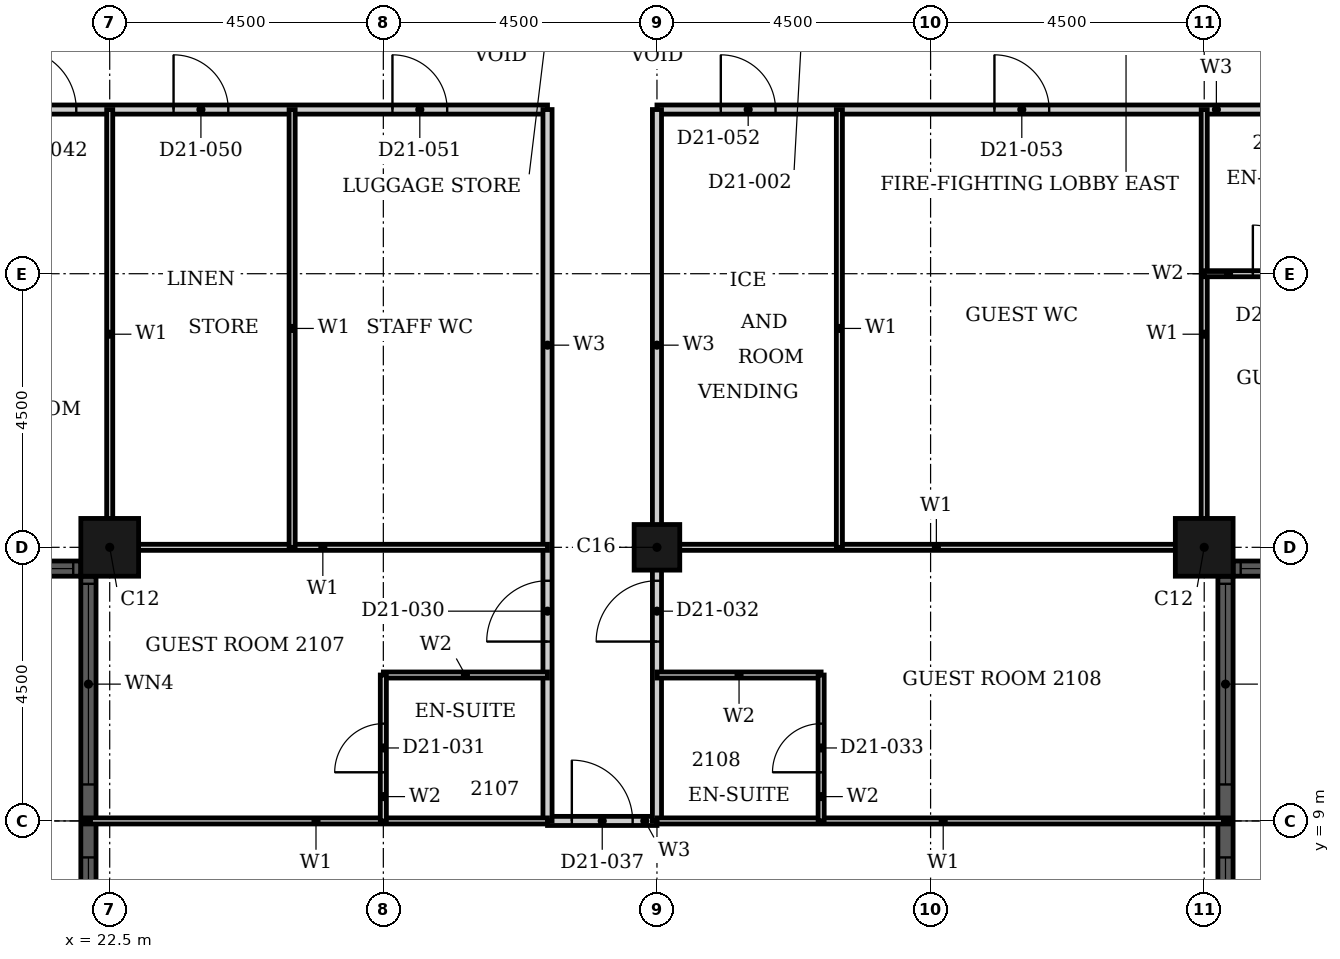
"""IFC4 building model, lengths in metres.
Left out: names, types, materials, properties, quantities, classifications, styles, units other than length and angle.
Written with IfcOpenShell. Run it as: python <this file> out.ifc"""

import sys

from ifc_helpers import new_model, si_unit, direction, frame, frame_2d, origin, origin_2d, place, context, subcontext, project, spatial, rectangle, hollow_rectangle, extrude, element, fill, save


model = new_model("IFC4")
c1 = context("Model", 3, precision=1e-05, world=origin(), true_north=direction((0.0, 1.0)))
c2 = subcontext(c1, "Body", "Model", "MODEL_VIEW")
j1 = project(units=[si_unit("LENGTHUNIT", "METRE"), si_unit("PLANEANGLEUNIT", "RADIAN")], contexts=[c1])
p1 = place(None, origin())
s1 = spatial("IfcSite", under=j1, at=p1, CompositionType="ELEMENT")
p2 = place(p1, origin())
s2 = spatial("IfcBuilding", under=s1, at=p2, CompositionType="ELEMENT")
p3 = place(p2, frame((0.0, 0.0, 88.8)))
s3 = spatial("IfcBuildingStorey", under=s2, at=p3, CompositionType="ELEMENT", Elevation=88.8)
for number, where, z_axis, x_axis in (
    (1, (40.5, 13.5, 0.0), (0.0, 0.0, 1.0), (1.0, 0.0, 0.0)),
    (2, (22.5, 13.5, 0.0), (0.0, 0.0, 1.0), (1.0, 0.0, 0.0)),
):
    element("IfcColumn", number, at=place(p3, frame(where, z_axis=z_axis, x_axis=x_axis)), inside=s3, PredefinedType="COLUMN", context=c2, shape_type="SweptSolid", body=[
        extrude(hollow_rectangle(XDim=0.95, YDim=0.95, WallThickness=0.03, at=origin_2d()), origin(), (0.0, 0.0, 1.0), 3.6),
    ])
p4 = place(p3, frame((31.5, 13.5, 0.0), z_axis=(0.0, 0.0, 1.0), x_axis=(1.0, 0.0, 0.0)))
e3 = element("IfcColumn", 3, at=p4, inside=s3, PredefinedType="COLUMN", context=c2, shape_type="SweptSolid", body=[
    extrude(hollow_rectangle(XDim=0.75, YDim=0.75, WallThickness=0.024, at=origin_2d()), origin(), (0.0, 0.0, 1.0), 3.6),
])
p5 = place(p3, frame((40.85, 4.975, 0.0), z_axis=(0.0, 0.0, 1.0), x_axis=(0.0, 1.0, 0.0)))
e4 = element("IfcWall", 4, at=p5, inside=s3, PredefinedType="SOLIDWALL", context=c2, shape_type="SweptSolid", body=[
    extrude(rectangle(XDim=8.05, YDim=0.25, at=frame_2d((4.025, 0.0))), origin(), (0.0, 0.0, 1.0), 3.6),
])
p6 = place(p5, frame((0.125, 0.0, 0.9)))
e5 = element("IfcOpeningElement", 5, at=p6, cuts=e4, PredefinedType="OPENING", context=c2, shape_type="SweptSolid", body=[
    extrude(rectangle(XDim=3.3, YDim=2.08, at=frame_2d((1.65, 1.04))), frame((0.0, 0.135, 0.0), z_axis=(0.0, -1.0, 0.0), x_axis=(1.0, 0.0, 0.0)), (0.0, 0.0, 1.0), 0.27),
])
p7 = place(p5, frame((4.625, 0.0, 0.9)))
e6 = element("IfcOpeningElement", 6, at=p7, cuts=e4, PredefinedType="OPENING", context=c2, shape_type="SweptSolid", body=[
    extrude(rectangle(XDim=3.3, YDim=2.08, at=frame_2d((1.65, 1.04))), frame((0.0, 0.135, 0.0), z_axis=(0.0, -1.0, 0.0), x_axis=(1.0, 0.0, 0.0)), (0.0, 0.0, 1.0), 0.27),
])
p8 = place(p3, frame((40.975, 13.15, 0.0), z_axis=(0.0, 0.0, 1.0), x_axis=(1.0, 0.0, 0.0)))
e7 = element("IfcWall", 7, at=p8, inside=s3, PredefinedType="SOLIDWALL", context=c2, shape_type="SweptSolid", body=[
    extrude(rectangle(XDim=3.55, YDim=0.25, at=frame_2d((1.775, 0.0))), origin(), (0.0, 0.0, 1.0), 3.6),
])
p9 = place(p8, frame((0.125, 0.0, 0.9)))
e8 = element("IfcOpeningElement", 8, at=p9, cuts=e7, PredefinedType="OPENING", context=c2, shape_type="SweptSolid", body=[
    extrude(rectangle(XDim=3.3, YDim=2.08, at=frame_2d((1.65, 1.04))), frame((0.0, 0.135, 0.0), z_axis=(0.0, -1.0, 0.0), x_axis=(1.0, 0.0, 0.0)), (0.0, 0.0, 1.0), 0.27),
])
p10 = place(p3, frame((18.475, 13.15, 0.0), z_axis=(0.0, 0.0, 1.0), x_axis=(1.0, 0.0, 0.0)))
e9 = element("IfcWall", 9, at=p10, inside=s3, PredefinedType="SOLIDWALL", context=c2, shape_type="SweptSolid", body=[
    extrude(rectangle(XDim=3.55, YDim=0.25, at=frame_2d((1.775, 0.0))), origin(), (0.0, 0.0, 1.0), 3.6),
])
p11 = place(p10, frame((0.125, 0.0, 0.9)))
e10 = element("IfcOpeningElement", 10, at=p11, cuts=e9, PredefinedType="OPENING", context=c2, shape_type="SweptSolid", body=[
    extrude(rectangle(XDim=3.3, YDim=2.08, at=frame_2d((1.65, 1.04))), frame((0.0, 0.135, 0.0), z_axis=(0.0, -1.0, 0.0), x_axis=(1.0, 0.0, 0.0)), (0.0, 0.0, 1.0), 0.27),
])
p12 = place(p3, frame((22.15, 13.025, 0.0), z_axis=(0.0, 0.0, 1.0), x_axis=(0.0, -1.0, 0.0)))
e11 = element("IfcWall", 11, at=p12, inside=s3, PredefinedType="SOLIDWALL", context=c2, shape_type="SweptSolid", body=[
    extrude(rectangle(XDim=8.05, YDim=0.25, at=frame_2d((4.025, 0.0))), origin(), (0.0, 0.0, 1.0), 3.6),
])
p13 = place(p12, frame((0.125, 0.0, 0.9)))
e12 = element("IfcOpeningElement", 12, at=p13, cuts=e11, PredefinedType="OPENING", context=c2, shape_type="SweptSolid", body=[
    extrude(rectangle(XDim=3.3, YDim=2.08, at=frame_2d((1.65, 1.04))), frame((0.0, 0.135, 0.0), z_axis=(0.0, -1.0, 0.0), x_axis=(1.0, 0.0, 0.0)), (0.0, 0.0, 1.0), 0.27),
])
p14 = place(p12, frame((4.625, 0.0, 0.9)))
e13 = element("IfcOpeningElement", 13, at=p14, cuts=e11, PredefinedType="OPENING", context=c2, shape_type="SweptSolid", body=[
    extrude(rectangle(XDim=3.3, YDim=2.08, at=frame_2d((1.65, 1.04))), frame((0.0, 0.135, 0.0), z_axis=(0.0, -1.0, 0.0), x_axis=(1.0, 0.0, 0.0)), (0.0, 0.0, 1.0), 0.27),
])
p15 = place(p3, frame((31.5, 20.7, 0.0), z_axis=(0.0, 0.0, 1.0), x_axis=(1.0, 0.0, 0.0)))
e14 = element("IfcWall", 14, at=p15, inside=s3, PredefinedType="PARTITIONING", context=c2, shape_type="SweptSolid", body=[
    extrude(rectangle(XDim=13.5, YDim=0.15, at=frame_2d((6.75, 0.0))), origin(), (0.0, 0.0, 1.0), 3.3),
])
p16 = place(p15, frame((11.95, 0.0, 0.0)))
e15 = element("IfcOpeningElement", 15, at=p16, cuts=e14, PredefinedType="OPENING", context=c2, shape_type="SweptSolid", body=[
    extrude(rectangle(XDim=1.0, YDim=2.1, at=frame_2d((0.5, 1.05))), frame((0.0, 0.085, 0.0), z_axis=(0.0, -1.0, 0.0), x_axis=(1.0, 0.0, 0.0)), (0.0, 0.0, 1.0), 0.17),
])
p17 = place(p15, frame((1.05, 0.0, 0.0)))
e16 = element("IfcOpeningElement", 16, at=p17, cuts=e14, PredefinedType="OPENING", context=c2, shape_type="SweptSolid", body=[
    extrude(rectangle(XDim=0.9, YDim=2.1, at=frame_2d((0.45, 1.05))), frame((0.0, 0.085, 0.0), z_axis=(0.0, -1.0, 0.0), x_axis=(1.0, 0.0, 0.0)), (0.0, 0.0, 1.0), 0.17),
])
p18 = place(p15, frame((5.55, 0.0, 0.0)))
e17 = element("IfcOpeningElement", 17, at=p18, cuts=e14, PredefinedType="OPENING", context=c2, shape_type="SweptSolid", body=[
    extrude(rectangle(XDim=0.9, YDim=2.1, at=frame_2d((0.45, 1.05))), frame((0.0, 0.085, 0.0), z_axis=(0.0, -1.0, 0.0), x_axis=(1.0, 0.0, 0.0)), (0.0, 0.0, 1.0), 0.17),
])
p19 = place(p3, frame((16.2, 20.7, 0.0), z_axis=(0.0, 0.0, 1.0), x_axis=(1.0, 0.0, 0.0)))
e18 = element("IfcWall", 18, at=p19, inside=s3, PredefinedType="PARTITIONING", context=c2, shape_type="SweptSolid", body=[
    extrude(rectangle(XDim=13.5, YDim=0.15, at=frame_2d((6.75, 0.0))), origin(), (0.0, 0.0, 1.0), 3.3),
])
p20 = place(p19, frame((4.75, 0.0, 0.0)))
e19 = element("IfcOpeningElement", 19, at=p20, cuts=e18, PredefinedType="OPENING", context=c2, shape_type="SweptSolid", body=[
    extrude(rectangle(XDim=1.0, YDim=2.1, at=frame_2d((0.5, 1.05))), frame((0.0, 0.085, 0.0), z_axis=(0.0, -1.0, 0.0), x_axis=(1.0, 0.0, 0.0)), (0.0, 0.0, 1.0), 0.17),
])
p21 = place(p19, frame((0.45, 0.0, 0.0)))
e20 = element("IfcOpeningElement", 20, at=p21, cuts=e18, PredefinedType="OPENING", context=c2, shape_type="SweptSolid", body=[
    extrude(rectangle(XDim=0.9, YDim=2.1, at=frame_2d((0.45, 1.05))), frame((0.0, 0.085, 0.0), z_axis=(0.0, -1.0, 0.0), x_axis=(1.0, 0.0, 0.0)), (0.0, 0.0, 1.0), 0.17),
])
p22 = place(p19, frame((7.35, 0.0, 0.0)))
e21 = element("IfcOpeningElement", 21, at=p22, cuts=e18, PredefinedType="OPENING", context=c2, shape_type="SweptSolid", body=[
    extrude(rectangle(XDim=0.9, YDim=2.1, at=frame_2d((0.45, 1.05))), frame((0.0, 0.085, 0.0), z_axis=(0.0, -1.0, 0.0), x_axis=(1.0, 0.0, 0.0)), (0.0, 0.0, 1.0), 0.17),
])
p23 = place(p19, frame((10.95, 0.0, 0.0)))
e22 = element("IfcOpeningElement", 22, at=p23, cuts=e18, PredefinedType="OPENING", context=c2, shape_type="SweptSolid", body=[
    extrude(rectangle(XDim=0.9, YDim=2.1, at=frame_2d((0.45, 1.05))), frame((0.0, 0.085, 0.0), z_axis=(0.0, -1.0, 0.0), x_axis=(1.0, 0.0, 0.0)), (0.0, 0.0, 1.0), 0.17),
])
p24 = place(p3, frame((29.7, 9.0, 0.0), z_axis=(0.0, 0.0, 1.0), x_axis=(1.0, 0.0, 0.0)))
e23 = element("IfcWall", 23, at=p24, inside=s3, PredefinedType="PARTITIONING", context=c2, shape_type="SweptSolid", body=[
    extrude(rectangle(XDim=1.8, YDim=0.15, at=frame_2d((0.9, 0.0))), origin(), (0.0, 0.0, 1.0), 3.3),
])
p25 = place(p24, frame((0.4, 0.0, 0.0)))
e24 = element("IfcOpeningElement", 24, at=p25, cuts=e23, PredefinedType="OPENING", context=c2, shape_type="SweptSolid", body=[
    extrude(rectangle(XDim=1.0, YDim=2.1, at=frame_2d((0.5, 1.05))), frame((0.0, 0.085, 0.0), z_axis=(0.0, -1.0, 0.0), x_axis=(1.0, 0.0, 0.0)), (0.0, 0.0, 1.0), 0.17),
])
p26 = place(p3, frame((29.7, 9.0, 0.0), z_axis=(0.0, 0.0, 1.0), x_axis=(0.0, 1.0, 0.0)))
e25 = element("IfcWall", 25, at=p26, inside=s3, PredefinedType="PARTITIONING", context=c2, shape_type="SweptSolid", body=[
    extrude(rectangle(XDim=11.7, YDim=0.15, at=frame_2d((5.85, 0.0))), origin(), (0.0, 0.0, 1.0), 3.3),
])
p27 = place(p26, frame((2.95, 0.0, 0.0)))
e26 = element("IfcOpeningElement", 26, at=p27, cuts=e25, PredefinedType="OPENING", context=c2, shape_type="SweptSolid", body=[
    extrude(rectangle(XDim=1.0, YDim=2.1, at=frame_2d((0.5, 1.05))), frame((0.0, 0.085, 0.0), z_axis=(0.0, -1.0, 0.0), x_axis=(1.0, 0.0, 0.0)), (0.0, 0.0, 1.0), 0.17),
])
p28 = place(p3, frame((31.5, 9.0, 0.0), z_axis=(0.0, 0.0, 1.0), x_axis=(0.0, 1.0, 0.0)))
e27 = element("IfcWall", 27, at=p28, inside=s3, PredefinedType="PARTITIONING", context=c2, shape_type="SweptSolid", body=[
    extrude(rectangle(XDim=11.7, YDim=0.15, at=frame_2d((5.85, 0.0))), origin(), (0.0, 0.0, 1.0), 2.58),
])
p29 = place(p28, frame((2.95, 0.0, 0.0)))
e28 = element("IfcOpeningElement", 28, at=p29, cuts=e27, PredefinedType="OPENING", context=c2, shape_type="SweptSolid", body=[
    extrude(rectangle(XDim=1.0, YDim=2.1, at=frame_2d((0.5, 1.05))), frame((0.0, 0.085, 0.0), z_axis=(0.0, -1.0, 0.0), x_axis=(1.0, 0.0, 0.0)), (0.0, 0.0, 1.0), 0.17),
])
p30 = place(p3, frame((31.5, 13.5, 0.0), z_axis=(0.0, 0.0, 1.0), x_axis=(1.0, 0.0, 0.0)))
e29 = element("IfcWall", 29, at=p30, inside=s3, PredefinedType="PARTITIONING", context=c2, shape_type="SweptSolid", body=[
    extrude(rectangle(XDim=9.19, YDim=0.1, at=frame_2d((4.595, 0.0))), origin(), (0.0, 0.0, 1.0), 2.38),
])
p31 = place(p3, frame((22.31, 13.5, 0.0), z_axis=(0.0, 0.0, 1.0), x_axis=(1.0, 0.0, 0.0)))
e30 = element("IfcWall", 30, at=p31, inside=s3, PredefinedType="PARTITIONING", context=c2, shape_type="SweptSolid", body=[
    extrude(rectangle(XDim=7.39, YDim=0.1, at=frame_2d((3.695, 0.0))), origin(), (0.0, 0.0, 1.0), 2.38),
])
p32 = place(p3, frame((31.5, 9.0, 0.0), z_axis=(0.0, 0.0, 1.0), x_axis=(1.0, 0.0, 0.0)))
e31 = element("IfcWall", 31, at=p32, inside=s3, PredefinedType="PARTITIONING", context=c2, shape_type="SweptSolid", body=[
    extrude(rectangle(XDim=9.415, YDim=0.1, at=frame_2d((4.708, 0.0))), origin(), (0.0, 0.0, 1.0), 3.3),
])
p33 = place(p3, frame((22.085, 9.0, 0.0), z_axis=(0.0, 0.0, 1.0), x_axis=(1.0, 0.0, 0.0)))
e32 = element("IfcWall", 32, at=p33, inside=s3, PredefinedType="PARTITIONING", context=c2, shape_type="SweptSolid", body=[
    extrude(rectangle(XDim=7.615, YDim=0.1, at=frame_2d((3.808, 0.0))), origin(), (0.0, 0.0, 1.0), 3.3),
])
p34 = place(p3, frame((22.5, 13.31, 0.0), z_axis=(0.0, 0.0, 1.0), x_axis=(0.0, 1.0, 0.0)))
e33 = element("IfcWall", 33, at=p34, inside=s3, PredefinedType="PARTITIONING", context=c2, shape_type="SweptSolid", body=[
    extrude(rectangle(XDim=7.39, YDim=0.1, at=frame_2d((3.695, 0.0))), origin(), (0.0, 0.0, 1.0), 3.3),
])
for number, where, z_axis, x_axis in (
    (34, (25.5, 13.5, 0.0), (0.0, 0.0, 1.0), (0.0, 1.0, 0.0)),
    (35, (34.5, 13.5, 0.0), (0.0, 0.0, 1.0), (0.0, 1.0, 0.0)),
):
    element("IfcWall", number, at=place(p3, frame(where, z_axis=z_axis, x_axis=x_axis)), inside=s3, PredefinedType="PARTITIONING", context=c2, shape_type="SweptSolid", body=[
        extrude(rectangle(XDim=7.2, YDim=0.1, at=frame_2d((3.6, 0.0))), origin(), (0.0, 0.0, 1.0), 3.3),
    ])
p35 = place(p3, frame((40.5, 13.31, 0.0), z_axis=(0.0, 0.0, 1.0), x_axis=(0.0, 1.0, 0.0)))
e36 = element("IfcWall", 36, at=p35, inside=s3, PredefinedType="PARTITIONING", context=c2, shape_type="SweptSolid", body=[
    extrude(rectangle(XDim=7.39, YDim=0.1, at=frame_2d((3.695, 0.0))), origin(), (0.0, 0.0, 1.0), 3.3),
])
for number, where, z_axis, x_axis in (
    (37, (31.5, 11.4, 0.0), (0.0, 0.0, 1.0), (1.0, 0.0, 0.0)),
    (38, (27.0, 11.4, 0.0), (0.0, 0.0, 1.0), (1.0, 0.0, 0.0)),
):
    element("IfcWall", number, at=place(p3, frame(where, z_axis=z_axis, x_axis=x_axis)), inside=s3, PredefinedType="PARTITIONING", context=c2, shape_type="SweptSolid", body=[
        extrude(rectangle(XDim=2.7, YDim=0.1, at=frame_2d((1.35, 0.0))), origin(), (0.0, 0.0, 1.0), 3.3),
    ])
p36 = place(p3, frame((40.5, 18.0, 0.0), z_axis=(0.0, 0.0, 1.0), x_axis=(1.0, 0.0, 0.0)))
e39 = element("IfcWall", 39, at=p36, inside=s3, PredefinedType="PARTITIONING", context=c2, shape_type="SweptSolid", body=[
    extrude(rectangle(XDim=2.4, YDim=0.1, at=frame_2d((1.2, 0.0))), origin(), (0.0, 0.0, 1.0), 3.3),
])
p37 = place(p36, frame((0.8, 0.0, 0.0)))
e40 = element("IfcOpeningElement", 40, at=p37, cuts=e39, PredefinedType="OPENING", context=c2, shape_type="SweptSolid", body=[
    extrude(rectangle(XDim=0.8, YDim=2.1, at=frame_2d((0.4, 1.05))), frame((0.0, 0.06, 0.0), z_axis=(0.0, -1.0, 0.0), x_axis=(1.0, 0.0, 0.0)), (0.0, 0.0, 1.0), 0.12),
])
p38 = place(p3, frame((27.0, 9.0, 0.0), z_axis=(0.0, 0.0, 1.0), x_axis=(0.0, 1.0, 0.0)))
e41 = element("IfcWall", 41, at=p38, inside=s3, PredefinedType="PARTITIONING", context=c2, shape_type="SweptSolid", body=[
    extrude(rectangle(XDim=2.4, YDim=0.1, at=frame_2d((1.2, 0.0))), origin(), (0.0, 0.0, 1.0), 2.58),
])
p39 = place(p38, frame((0.8, 0.0, 0.0)))
e42 = element("IfcOpeningElement", 42, at=p39, cuts=e41, PredefinedType="OPENING", context=c2, shape_type="SweptSolid", body=[
    extrude(rectangle(XDim=0.8, YDim=2.1, at=frame_2d((0.4, 1.05))), frame((0.0, 0.06, 0.0), z_axis=(0.0, -1.0, 0.0), x_axis=(1.0, 0.0, 0.0)), (0.0, 0.0, 1.0), 0.12),
])
p40 = place(p3, frame((34.2, 9.0, 0.0), z_axis=(0.0, 0.0, 1.0), x_axis=(0.0, 1.0, 0.0)))
e43 = element("IfcWall", 43, at=p40, inside=s3, PredefinedType="PARTITIONING", context=c2, shape_type="SweptSolid", body=[
    extrude(rectangle(XDim=2.4, YDim=0.1, at=frame_2d((1.2, 0.0))), origin(), (0.0, 0.0, 1.0), 3.3),
])
p41 = place(p40, frame((0.8, 0.0, 0.0)))
e44 = element("IfcOpeningElement", 44, at=p41, cuts=e43, PredefinedType="OPENING", context=c2, shape_type="SweptSolid", body=[
    extrude(rectangle(XDim=0.8, YDim=2.1, at=frame_2d((0.4, 1.05))), frame((0.0, 0.06, 0.0), z_axis=(0.0, -1.0, 0.0), x_axis=(1.0, 0.0, 0.0)), (0.0, 0.0, 1.0), 0.12),
])
p42 = place(p6, origin())
e45 = element("IfcWindow", 45, at=p42, inside=s3, PartitioningType="SINGLE_PANEL", PredefinedType="WINDOW", context=c2, shape_type="SweptSolid", body=[
    extrude(rectangle(XDim=3.3, YDim=2.08, at=frame_2d((1.65, 1.04))), frame((0.0, 0.03, 0.0), z_axis=(0.0, -1.0, 0.0), x_axis=(1.0, 0.0, 0.0)), (0.0, 0.0, 1.0), 0.06),
])
fill(e5, e45)
p43 = place(p7, origin())
e46 = element("IfcWindow", 46, at=p43, inside=s3, PartitioningType="SINGLE_PANEL", PredefinedType="WINDOW", context=c2, shape_type="SweptSolid", body=[
    extrude(rectangle(XDim=3.3, YDim=2.08, at=frame_2d((1.65, 1.04))), frame((0.0, 0.03, 0.0), z_axis=(0.0, -1.0, 0.0), x_axis=(1.0, 0.0, 0.0)), (0.0, 0.0, 1.0), 0.06),
])
fill(e6, e46)
p44 = place(p9, origin())
e47 = element("IfcWindow", 47, at=p44, inside=s3, PartitioningType="SINGLE_PANEL", PredefinedType="WINDOW", context=c2, shape_type="SweptSolid", body=[
    extrude(rectangle(XDim=3.3, YDim=2.08, at=frame_2d((1.65, 1.04))), frame((0.0, 0.03, 0.0), z_axis=(0.0, -1.0, 0.0), x_axis=(1.0, 0.0, 0.0)), (0.0, 0.0, 1.0), 0.06),
])
fill(e8, e47)
p45 = place(p11, origin())
e48 = element("IfcWindow", 48, at=p45, inside=s3, PartitioningType="SINGLE_PANEL", PredefinedType="WINDOW", context=c2, shape_type="SweptSolid", body=[
    extrude(rectangle(XDim=3.3, YDim=2.08, at=frame_2d((1.65, 1.04))), frame((0.0, 0.03, 0.0), z_axis=(0.0, -1.0, 0.0), x_axis=(1.0, 0.0, 0.0)), (0.0, 0.0, 1.0), 0.06),
])
fill(e10, e48)
p46 = place(p13, origin())
e49 = element("IfcWindow", 49, at=p46, inside=s3, PartitioningType="SINGLE_PANEL", PredefinedType="WINDOW", context=c2, shape_type="SweptSolid", body=[
    extrude(rectangle(XDim=3.3, YDim=2.08, at=frame_2d((1.65, 1.04))), frame((0.0, 0.03, 0.0), z_axis=(0.0, -1.0, 0.0), x_axis=(1.0, 0.0, 0.0)), (0.0, 0.0, 1.0), 0.06),
])
fill(e12, e49)
p47 = place(p14, origin())
e50 = element("IfcWindow", 50, at=p47, inside=s3, PartitioningType="SINGLE_PANEL", PredefinedType="WINDOW", context=c2, shape_type="SweptSolid", body=[
    extrude(rectangle(XDim=3.3, YDim=2.08, at=frame_2d((1.65, 1.04))), frame((0.0, 0.03, 0.0), z_axis=(0.0, -1.0, 0.0), x_axis=(1.0, 0.0, 0.0)), (0.0, 0.0, 1.0), 0.06),
])
fill(e13, e50)
p48 = place(p27, origin())
e51 = element("IfcDoor", 51, at=p48, inside=s3, OperationType="SINGLE_SWING_RIGHT", PredefinedType="DOOR", context=c2, shape_type="SweptSolid", body=[
    extrude(rectangle(XDim=1.0, YDim=2.1, at=frame_2d((0.5, 1.05))), frame((0.0, 0.025, 0.0), z_axis=(0.0, -1.0, 0.0), x_axis=(1.0, 0.0, 0.0)), (0.0, 0.0, 1.0), 0.05),
])
fill(e26, e51)
p49 = place(p39, origin())
e52 = element("IfcDoor", 52, at=p49, inside=s3, OperationType="SINGLE_SWING_RIGHT", PredefinedType="DOOR", context=c2, shape_type="SweptSolid", body=[
    extrude(rectangle(XDim=0.8, YDim=2.1, at=frame_2d((0.4, 1.05))), frame((0.0, 0.025, 0.0), z_axis=(0.0, -1.0, 0.0), x_axis=(1.0, 0.0, 0.0)), (0.0, 0.0, 1.0), 0.05),
])
fill(e42, e52)
p50 = place(p29, origin())
e53 = element("IfcDoor", 53, at=p50, inside=s3, OperationType="SINGLE_SWING_RIGHT", PredefinedType="DOOR", context=c2, shape_type="SweptSolid", body=[
    extrude(rectangle(XDim=1.0, YDim=2.1, at=frame_2d((0.5, 1.05))), frame((0.0, 0.025, 0.0), z_axis=(0.0, -1.0, 0.0), x_axis=(1.0, 0.0, 0.0)), (0.0, 0.0, 1.0), 0.05),
])
fill(e28, e53)
p51 = place(p41, origin())
e54 = element("IfcDoor", 54, at=p51, inside=s3, OperationType="SINGLE_SWING_RIGHT", PredefinedType="DOOR", context=c2, shape_type="SweptSolid", body=[
    extrude(rectangle(XDim=0.8, YDim=2.1, at=frame_2d((0.4, 1.05))), frame((0.0, 0.025, 0.0), z_axis=(0.0, -1.0, 0.0), x_axis=(1.0, 0.0, 0.0)), (0.0, 0.0, 1.0), 0.05),
])
fill(e44, e54)
p52 = place(p25, origin())
e55 = element("IfcDoor", 55, at=p52, inside=s3, OperationType="SINGLE_SWING_RIGHT", PredefinedType="DOOR", context=c2, shape_type="SweptSolid", body=[
    extrude(rectangle(XDim=1.0, YDim=2.1, at=frame_2d((0.5, 1.05))), frame((0.0, 0.025, 0.0), z_axis=(0.0, -1.0, 0.0), x_axis=(1.0, 0.0, 0.0)), (0.0, 0.0, 1.0), 0.05),
])
fill(e24, e55)
p53 = place(p20, origin())
e56 = element("IfcDoor", 56, at=p53, inside=s3, OperationType="SINGLE_SWING_RIGHT", PredefinedType="DOOR", context=c2, shape_type="SweptSolid", body=[
    extrude(rectangle(XDim=1.0, YDim=2.1, at=frame_2d((0.5, 1.05))), frame((0.0, 0.025, 0.0), z_axis=(0.0, -1.0, 0.0), x_axis=(1.0, 0.0, 0.0)), (0.0, 0.0, 1.0), 0.05),
])
fill(e19, e56)
p54 = place(p37, origin())
e57 = element("IfcDoor", 57, at=p54, inside=s3, OperationType="SINGLE_SWING_LEFT", PredefinedType="DOOR", context=c2, shape_type="SweptSolid", body=[
    extrude(rectangle(XDim=0.8, YDim=2.1, at=frame_2d((0.4, 1.05))), frame((0.0, 0.025, 0.0), z_axis=(0.0, -1.0, 0.0), x_axis=(1.0, 0.0, 0.0)), (0.0, 0.0, 1.0), 0.05),
])
fill(e40, e57)
p55 = place(p22, origin())
e58 = element("IfcDoor", 58, at=p55, inside=s3, OperationType="SINGLE_SWING_LEFT", PredefinedType="DOOR", context=c2, shape_type="SweptSolid", body=[
    extrude(rectangle(XDim=0.9, YDim=2.1, at=frame_2d((0.45, 1.05))), frame((0.0, 0.025, 0.0), z_axis=(0.0, -1.0, 0.0), x_axis=(1.0, 0.0, 0.0)), (0.0, 0.0, 1.0), 0.05),
])
fill(e21, e58)
p56 = place(p23, origin())
e59 = element("IfcDoor", 59, at=p56, inside=s3, OperationType="SINGLE_SWING_LEFT", PredefinedType="DOOR", context=c2, shape_type="SweptSolid", body=[
    extrude(rectangle(XDim=0.9, YDim=2.1, at=frame_2d((0.45, 1.05))), frame((0.0, 0.025, 0.0), z_axis=(0.0, -1.0, 0.0), x_axis=(1.0, 0.0, 0.0)), (0.0, 0.0, 1.0), 0.05),
])
fill(e22, e59)
p57 = place(p17, origin())
e60 = element("IfcDoor", 60, at=p57, inside=s3, OperationType="SINGLE_SWING_LEFT", PredefinedType="DOOR", context=c2, shape_type="SweptSolid", body=[
    extrude(rectangle(XDim=0.9, YDim=2.1, at=frame_2d((0.45, 1.05))), frame((0.0, 0.025, 0.0), z_axis=(0.0, -1.0, 0.0), x_axis=(1.0, 0.0, 0.0)), (0.0, 0.0, 1.0), 0.05),
])
fill(e16, e60)
p58 = place(p18, origin())
e61 = element("IfcDoor", 61, at=p58, inside=s3, OperationType="SINGLE_SWING_RIGHT", PredefinedType="DOOR", context=c2, shape_type="SweptSolid", body=[
    extrude(rectangle(XDim=0.9, YDim=2.1, at=frame_2d((0.45, 1.05))), frame((0.0, 0.025, 0.0), z_axis=(0.0, -1.0, 0.0), x_axis=(1.0, 0.0, 0.0)), (0.0, 0.0, 1.0), 0.05),
])
fill(e17, e61)
save(model, sys.argv[1])
